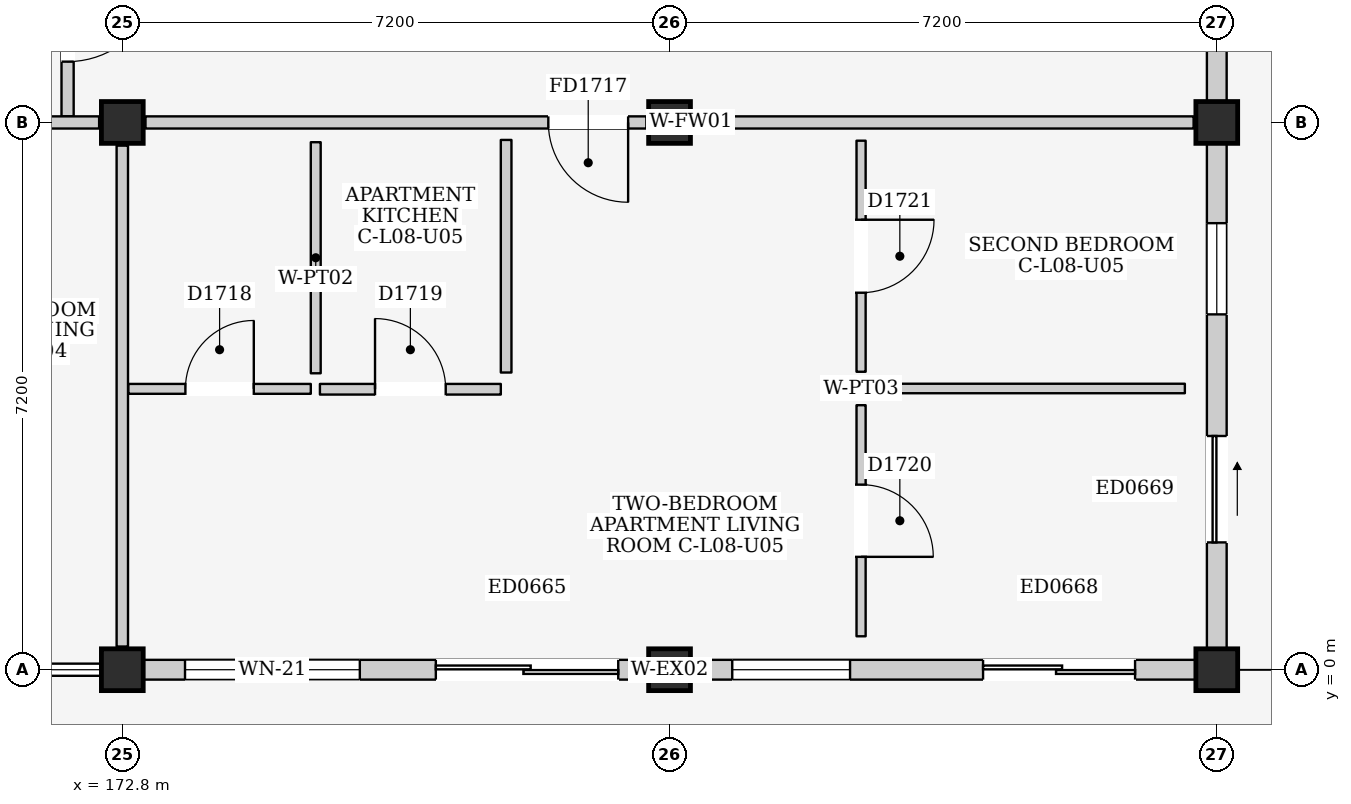
"""IFC4 building model, lengths in metres.
Left out: names, types, materials, properties, quantities, classifications, styles, units other than length and angle.
Written with IfcOpenShell. Run it as: python <this file> out.ifc"""

import sys

from ifc_helpers import new_model, si_unit, direction, frame, frame_2d, origin, origin_2d, place, context, subcontext, project, spatial, rectangle, extrude, element, fill, save


model = new_model("IFC4")
c1 = context("Model", 3, precision=1e-05, world=origin(), true_north=direction((0.0, 1.0)))
c2 = subcontext(c1, "Body", "Model", "MODEL_VIEW")
j1 = project(units=[si_unit("LENGTHUNIT", "METRE"), si_unit("PLANEANGLEUNIT", "RADIAN")], contexts=[c1])
p1 = place(None, origin())
s1 = spatial("IfcSite", under=j1, at=p1, CompositionType="ELEMENT")
p2 = place(p1, origin())
s2 = spatial("IfcBuilding", under=s1, at=p2, CompositionType="ELEMENT")
p3 = place(p2, frame((0.0, 0.0, 28.3)))
s3 = spatial("IfcBuildingStorey", under=s2, at=p3, CompositionType="ELEMENT", Elevation=28.3)
for number, where, z_axis, x_axis in (
    (1, (172.8, 0.0, 0.0), (0.0, 0.0, 1.0), (1.0, 0.0, 0.0)),
    (2, (172.8, 7.2, 0.0), (0.0, 0.0, 1.0), (1.0, 0.0, 0.0)),
    (3, (180.0, 0.0, 0.0), (0.0, 0.0, 1.0), (1.0, 0.0, 0.0)),
    (4, (180.0, 7.2, 0.0), (0.0, 0.0, 1.0), (1.0, 0.0, 0.0)),
    (5, (187.2, 0.0, 0.0), (0.0, 0.0, 1.0), (1.0, 0.0, 0.0)),
    (6, (187.2, 7.2, 0.0), (0.0, 0.0, 1.0), (1.0, 0.0, 0.0)),
):
    element("IfcColumn", number, at=place(p3, frame(where, z_axis=z_axis, x_axis=x_axis)), inside=s3, PredefinedType="COLUMN", context=c2, shape_type="SweptSolid", body=[
        extrude(rectangle(XDim=0.55, YDim=0.55, at=origin_2d()), origin(), (0.0, 0.0, 1.0), 3.2),
    ])
p4 = place(p3, frame((173.075, 0.0, 0.0), z_axis=(0.0, 0.0, 1.0), x_axis=(1.0, 0.0, 0.0)))
e7 = element("IfcWall", 7, at=p4, inside=s3, PredefinedType="ELEMENTEDWALL", context=c2, shape_type="SweptSolid", body=[
    extrude(rectangle(XDim=6.65, YDim=0.26, at=frame_2d((3.325, 0.0))), origin(), (0.0, 0.0, 1.0), 2.485),
])
p5 = place(p4, frame((3.85, 0.0, 0.0)))
e8 = element("IfcOpeningElement", 8, at=p5, cuts=e7, PredefinedType="OPENING", context=c2, shape_type="SweptSolid", body=[
    extrude(rectangle(XDim=2.4, YDim=2.12, at=frame_2d((1.2, 1.06))), frame((0.0, 0.145, 0.0), z_axis=(0.0, -1.0, 0.0), x_axis=(1.0, 0.0, 0.0)), (0.0, 0.0, 1.0), 0.29),
])
p6 = place(p4, frame((0.55, 0.0, 0.775)))
e9 = element("IfcOpeningElement", 9, at=p6, cuts=e7, PredefinedType="OPENING", context=c2, shape_type="SweptSolid", body=[
    extrude(rectangle(XDim=2.3, YDim=1.6, at=frame_2d((1.15, 0.8))), frame((0.0, 0.145, 0.0), z_axis=(0.0, -1.0, 0.0), x_axis=(1.0, 0.0, 0.0)), (0.0, 0.0, 1.0), 0.29),
])
p7 = place(p3, frame((180.275, 0.0, 0.0), z_axis=(0.0, 0.0, 1.0), x_axis=(1.0, 0.0, 0.0)))
e10 = element("IfcWall", 10, at=p7, inside=s3, PredefinedType="ELEMENTEDWALL", context=c2, shape_type="SweptSolid", body=[
    extrude(rectangle(XDim=6.65, YDim=0.26, at=frame_2d((3.325, 0.0))), origin(), (0.0, 0.0, 1.0), 2.485),
])
p8 = place(p7, frame((3.85, 0.0, 0.0)))
e11 = element("IfcOpeningElement", 11, at=p8, cuts=e10, PredefinedType="OPENING", context=c2, shape_type="SweptSolid", body=[
    extrude(rectangle(XDim=2.0, YDim=2.12, at=frame_2d((1.0, 1.06))), frame((0.0, 0.145, 0.0), z_axis=(0.0, -1.0, 0.0), x_axis=(1.0, 0.0, 0.0)), (0.0, 0.0, 1.0), 0.29),
])
p9 = place(p7, frame((0.55, 0.0, 0.9)))
e12 = element("IfcOpeningElement", 12, at=p9, cuts=e10, PredefinedType="OPENING", context=c2, shape_type="SweptSolid", body=[
    extrude(rectangle(XDim=1.55, YDim=1.45, at=frame_2d((0.775, 0.725))), frame((0.0, 0.145, 0.0), z_axis=(0.0, -1.0, 0.0), x_axis=(1.0, 0.0, 0.0)), (0.0, 0.0, 1.0), 0.29),
])
p10 = place(p3, frame((187.2, 0.275, 0.0), z_axis=(0.0, 0.0, 1.0), x_axis=(0.0, 1.0, 0.0)))
e13 = element("IfcWall", 13, at=p10, inside=s3, PredefinedType="ELEMENTEDWALL", context=c2, shape_type="SweptSolid", body=[
    extrude(rectangle(XDim=6.65, YDim=0.26, at=frame_2d((3.325, 0.0))), origin(), (0.0, 0.0, 1.0), 2.485),
])
p11 = place(p10, frame((1.4, 0.0, 0.0)))
e14 = element("IfcOpeningElement", 14, at=p11, cuts=e13, PredefinedType="OPENING", context=c2, shape_type="SweptSolid", body=[
    extrude(rectangle(XDim=1.4, YDim=2.1, at=frame_2d((0.7, 1.05))), frame((0.0, 0.145, 0.0), z_axis=(0.0, -1.0, 0.0), x_axis=(1.0, 0.0, 0.0)), (0.0, 0.0, 1.0), 0.29),
])
p12 = place(p10, frame((4.4, 0.0, 0.95)))
e15 = element("IfcOpeningElement", 15, at=p12, cuts=e13, PredefinedType="OPENING", context=c2, shape_type="SweptSolid", body=[
    extrude(rectangle(XDim=1.2, YDim=1.35, at=frame_2d((0.6, 0.675))), frame((0.0, 0.145, 0.0), z_axis=(0.0, -1.0, 0.0), x_axis=(1.0, 0.0, 0.0)), (0.0, 0.0, 1.0), 0.29),
])
p13 = place(p3, frame((187.2, 7.475, 0.0), z_axis=(0.0, 0.0, 1.0), x_axis=(0.0, 1.0, 0.0)))
e16 = element("IfcWall", 16, at=p13, inside=s3, PredefinedType="ELEMENTEDWALL", context=c2, shape_type="SweptSolid", body=[
    extrude(rectangle(XDim=6.65, YDim=0.26, at=frame_2d((3.325, 0.0))), origin(), (0.0, 0.0, 1.0), 2.485),
])
p14 = place(p13, frame((3.65, 0.0, 0.0)))
e17 = element("IfcOpeningElement", 17, at=p14, cuts=e16, PredefinedType="OPENING", context=c2, shape_type="SweptSolid", body=[
    extrude(rectangle(XDim=1.4, YDim=2.1, at=frame_2d((0.7, 1.05))), frame((0.0, 0.145, 0.0), z_axis=(0.0, -1.0, 0.0), x_axis=(1.0, 0.0, 0.0)), (0.0, 0.0, 1.0), 0.29),
])
p15 = place(p3, frame((172.08, 7.28, 0.0), z_axis=(0.0, 0.0, 1.0), x_axis=(0.0, 1.0, 0.0)))
e18 = element("IfcWall", 18, at=p15, inside=s3, PredefinedType="PARTITIONING", context=c2, shape_type="SweptSolid", body=[
    extrude(rectangle(XDim=4.32, YDim=0.16, at=frame_2d((2.16, 0.0))), origin(), (0.0, 0.0, 1.0), 2.95),
])
p16 = place(p15, frame((0.72, 0.0, 0.0)))
e19 = element("IfcOpeningElement", 19, at=p16, cuts=e18, PredefinedType="OPENING", context=c2, shape_type="SweptSolid", body=[
    extrude(rectangle(XDim=1.2, YDim=2.2, at=frame_2d((0.6, 1.1))), frame((0.0, 0.095, 0.0), z_axis=(0.0, -1.0, 0.0), x_axis=(1.0, 0.0, 0.0)), (0.0, 0.0, 1.0), 0.19),
])
p17 = place(p3, frame((165.905, 7.2, 0.0), z_axis=(0.0, 0.0, 1.0), x_axis=(1.0, 0.0, 0.0)))
e20 = element("IfcWall", 20, at=p17, inside=s3, PredefinedType="PARTITIONING", context=c2, shape_type="SweptSolid", body=[
    extrude(rectangle(XDim=6.59, YDim=0.16, at=frame_2d((3.295, 0.0))), origin(), (0.0, 0.0, 1.0), 2.335),
])
p18 = place(p17, frame((4.32, 0.0, 0.0)))
e21 = element("IfcOpeningElement", 21, at=p18, cuts=e20, PredefinedType="OPENING", context=c2, shape_type="SweptSolid", body=[
    extrude(rectangle(XDim=1.05, YDim=2.15, at=frame_2d((0.525, 1.075))), frame((0.0, 0.095, 0.0), z_axis=(0.0, -1.0, 0.0), x_axis=(1.0, 0.0, 0.0)), (0.0, 0.0, 1.0), 0.19),
])
p19 = place(p3, frame((172.8, 0.305, 0.0), z_axis=(0.0, 0.0, 1.0), x_axis=(0.0, 1.0, 0.0)))
e22 = element("IfcWall", 22, at=p19, inside=s3, PredefinedType="PARTITIONING", context=c2, shape_type="SweptSolid", body=[
    extrude(rectangle(XDim=6.59, YDim=0.15, at=frame_2d((3.295, 0.0))), origin(), (0.0, 0.0, 1.0), 2.435),
])
p20 = place(p3, frame((173.105, 7.2, 0.0), z_axis=(0.0, 0.0, 1.0), x_axis=(1.0, 0.0, 0.0)))
e23 = element("IfcWall", 23, at=p20, inside=s3, PredefinedType="PARTITIONING", context=c2, shape_type="SweptSolid", body=[
    extrude(rectangle(XDim=6.59, YDim=0.16, at=frame_2d((3.295, 0.0))), origin(), (0.0, 0.0, 1.0), 2.335),
])
p21 = place(p20, frame((5.3, 0.0, 0.0)))
e24 = element("IfcOpeningElement", 24, at=p21, cuts=e23, PredefinedType="OPENING", context=c2, shape_type="SweptSolid", body=[
    extrude(rectangle(XDim=1.05, YDim=2.15, at=frame_2d((0.525, 1.075))), frame((0.0, 0.095, 0.0), z_axis=(0.0, -1.0, 0.0), x_axis=(1.0, 0.0, 0.0)), (0.0, 0.0, 1.0), 0.19),
])
p22 = place(p3, frame((180.305, 7.2, 0.0), z_axis=(0.0, 0.0, 1.0), x_axis=(1.0, 0.0, 0.0)))
e25 = element("IfcWall", 25, at=p22, inside=s3, PredefinedType="PARTITIONING", context=c2, shape_type="SweptSolid", body=[
    extrude(rectangle(XDim=6.59, YDim=0.16, at=frame_2d((3.295, 0.0))), origin(), (0.0, 0.0, 1.0), 2.335),
])
p23 = place(p3, frame((172.88, 3.695, 0.0), z_axis=(0.0, 0.0, 1.0), x_axis=(1.0, 0.0, 0.0)))
e26 = element("IfcWall", 26, at=p23, inside=s3, PredefinedType="PARTITIONING", context=c2, shape_type="SweptSolid", body=[
    extrude(rectangle(XDim=2.4, YDim=0.13, at=frame_2d((1.2, 0.0))), origin(), (0.0, 0.0, 1.0), 2.95),
])
p24 = place(p23, frame((0.75, 0.0, 0.0)))
e27 = element("IfcOpeningElement", 27, at=p24, cuts=e26, PredefinedType="OPENING", context=c2, shape_type="SweptSolid", body=[
    extrude(rectangle(XDim=0.9, YDim=2.1, at=frame_2d((0.45, 1.05))), frame((0.0, 0.08, 0.0), z_axis=(0.0, -1.0, 0.0), x_axis=(1.0, 0.0, 0.0)), (0.0, 0.0, 1.0), 0.16),
])
p25 = place(p3, frame((175.345, 3.9, 0.0), z_axis=(0.0, 0.0, 1.0), x_axis=(0.0, 1.0, 0.0)))
e28 = element("IfcWall", 28, at=p25, inside=s3, PredefinedType="PARTITIONING", context=c2, shape_type="SweptSolid", body=[
    extrude(rectangle(XDim=3.04, YDim=0.13, at=frame_2d((1.52, 0.0))), origin(), (0.0, 0.0, 1.0), 2.95),
])
p26 = place(p3, frame((175.4, 3.69, 0.0), z_axis=(0.0, 0.0, 1.0), x_axis=(1.0, 0.0, 0.0)))
e29 = element("IfcWall", 29, at=p26, inside=s3, PredefinedType="PARTITIONING", context=c2, shape_type="SweptSolid", body=[
    extrude(rectangle(XDim=2.38, YDim=0.14, at=frame_2d((1.19, 0.0))), origin(), (0.0, 0.0, 1.0), 2.95),
])
p27 = place(p26, frame((0.725, 0.0, 0.0)))
e30 = element("IfcOpeningElement", 30, at=p27, cuts=e29, PredefinedType="OPENING", context=c2, shape_type="SweptSolid", body=[
    extrude(rectangle(XDim=0.93, YDim=2.14, at=frame_2d((0.465, 1.07))), frame((0.0, 0.085, 0.0), z_axis=(0.0, -1.0, 0.0), x_axis=(1.0, 0.0, 0.0)), (0.0, 0.0, 1.0), 0.17),
])
p28 = place(p3, frame((177.85, 3.91, 0.0), z_axis=(0.0, 0.0, 1.0), x_axis=(0.0, 1.0, 0.0)))
e31 = element("IfcWall", 31, at=p28, inside=s3, PredefinedType="PARTITIONING", context=c2, shape_type="SweptSolid", body=[
    extrude(rectangle(XDim=3.06, YDim=0.14, at=frame_2d((1.53, 0.0))), origin(), (0.0, 0.0, 1.0), 2.95),
])
p29 = place(p3, frame((182.52, 0.44, 0.0), z_axis=(0.0, 0.0, 1.0), x_axis=(0.0, 1.0, 0.0)))
e32 = element("IfcWall", 32, at=p29, inside=s3, PredefinedType="PARTITIONING", context=c2, shape_type="SweptSolid", body=[
    extrude(rectangle(XDim=3.04, YDim=0.12, at=frame_2d((1.52, 0.0))), origin(), (0.0, 0.0, 1.0), 2.95),
])
p30 = place(p29, frame((1.045, 0.0, 0.0)))
e33 = element("IfcOpeningElement", 33, at=p30, cuts=e32, PredefinedType="OPENING", context=c2, shape_type="SweptSolid", body=[
    extrude(rectangle(XDim=0.95, YDim=2.15, at=frame_2d((0.475, 1.075))), frame((0.0, 0.075, 0.0), z_axis=(0.0, -1.0, 0.0), x_axis=(1.0, 0.0, 0.0)), (0.0, 0.0, 1.0), 0.15),
])
p31 = place(p3, frame((182.72, 3.7, 0.0), z_axis=(0.0, 0.0, 1.0), x_axis=(1.0, 0.0, 0.0)))
e34 = element("IfcWall", 34, at=p31, inside=s3, PredefinedType="PARTITIONING", context=c2, shape_type="SweptSolid", body=[
    extrude(rectangle(XDim=4.06, YDim=0.125, at=frame_2d((2.03, 0.0))), origin(), (0.0, 0.0, 1.0), 2.95),
])
p32 = place(p3, frame((182.52, 3.92, 0.0), z_axis=(0.0, 0.0, 1.0), x_axis=(0.0, 1.0, 0.0)))
e35 = element("IfcWall", 35, at=p32, inside=s3, PredefinedType="PARTITIONING", context=c2, shape_type="SweptSolid", body=[
    extrude(rectangle(XDim=3.04, YDim=0.12, at=frame_2d((1.52, 0.0))), origin(), (0.0, 0.0, 1.0), 2.95),
])
p33 = place(p32, frame((1.04, 0.0, 0.0)))
e36 = element("IfcOpeningElement", 36, at=p33, cuts=e35, PredefinedType="OPENING", context=c2, shape_type="SweptSolid", body=[
    extrude(rectangle(XDim=0.96, YDim=2.15, at=frame_2d((0.48, 1.075))), frame((0.0, 0.075, 0.0), z_axis=(0.0, -1.0, 0.0), x_axis=(1.0, 0.0, 0.0)), (0.0, 0.0, 1.0), 0.15),
])
p34 = place(p5, frame((2.4, 0.0, 0.0), z_axis=(0.0, 0.0, 1.0), x_axis=(-1.0, 0.0, 0.0)))
e37 = element("IfcDoor", 37, at=p34, inside=s3, OperationType="DOUBLE_DOOR_SLIDING", PredefinedType="DOOR", context=c2, shape_type="SweptSolid", body=[
    extrude(rectangle(XDim=2.4, YDim=2.12, at=frame_2d((1.2, 1.06))), frame((0.0, 0.025, 0.0), z_axis=(0.0, -1.0, 0.0), x_axis=(1.0, 0.0, 0.0)), (0.0, 0.0, 1.0), 0.05),
])
fill(e8, e37)
p35 = place(p6, origin())
e38 = element("IfcWindow", 38, at=p35, inside=s3, PartitioningType="TRIPLE_PANEL_VERTICAL", PredefinedType="WINDOW", context=c2, shape_type="SweptSolid", body=[
    extrude(rectangle(XDim=2.3, YDim=1.6, at=frame_2d((1.15, 0.8))), frame((0.0, 0.03, 0.0), z_axis=(0.0, -1.0, 0.0), x_axis=(1.0, 0.0, 0.0)), (0.0, 0.0, 1.0), 0.06),
])
fill(e9, e38)
p36 = place(p8, frame((2.0, 0.0, 0.0), z_axis=(0.0, 0.0, 1.0), x_axis=(-1.0, 0.0, 0.0)))
e39 = element("IfcDoor", 39, at=p36, inside=s3, OperationType="DOUBLE_DOOR_SLIDING", PredefinedType="DOOR", context=c2, shape_type="SweptSolid", body=[
    extrude(rectangle(XDim=2.0, YDim=2.12, at=frame_2d((1.0, 1.06))), frame((0.0, 0.025, 0.0), z_axis=(0.0, -1.0, 0.0), x_axis=(1.0, 0.0, 0.0)), (0.0, 0.0, 1.0), 0.05),
])
fill(e11, e39)
p37 = place(p9, origin())
e40 = element("IfcWindow", 40, at=p37, inside=s3, PartitioningType="DOUBLE_PANEL_VERTICAL", PredefinedType="WINDOW", context=c2, shape_type="SweptSolid", body=[
    extrude(rectangle(XDim=1.55, YDim=1.45, at=frame_2d((0.775, 0.725))), frame((0.0, 0.03, 0.0), z_axis=(0.0, -1.0, 0.0), x_axis=(1.0, 0.0, 0.0)), (0.0, 0.0, 1.0), 0.06),
])
fill(e12, e40)
p38 = place(p11, frame((1.4, 0.0, 0.0), z_axis=(0.0, 0.0, 1.0), x_axis=(-1.0, 0.0, 0.0)))
e41 = element("IfcDoor", 41, at=p38, inside=s3, OperationType="SLIDING_TO_RIGHT", PredefinedType="DOOR", context=c2, shape_type="SweptSolid", body=[
    extrude(rectangle(XDim=1.4, YDim=2.1, at=frame_2d((0.7, 1.05))), frame((0.0, 0.025, 0.0), z_axis=(0.0, -1.0, 0.0), x_axis=(1.0, 0.0, 0.0)), (0.0, 0.0, 1.0), 0.05),
])
fill(e14, e41)
p39 = place(p12, origin())
e42 = element("IfcWindow", 42, at=p39, inside=s3, PartitioningType="SINGLE_PANEL", PredefinedType="WINDOW", context=c2, shape_type="SweptSolid", body=[
    extrude(rectangle(XDim=1.2, YDim=1.35, at=frame_2d((0.6, 0.675))), frame((0.0, 0.03, 0.0), z_axis=(0.0, -1.0, 0.0), x_axis=(1.0, 0.0, 0.0)), (0.0, 0.0, 1.0), 0.06),
])
fill(e15, e42)
p40 = place(p16, frame((1.2, 0.0, 0.0), z_axis=(0.0, 0.0, 1.0), x_axis=(-1.0, 0.0, 0.0)))
e43 = element("IfcDoor", 43, at=p40, inside=s3, OperationType="SINGLE_SWING_LEFT", PredefinedType="DOOR", context=c2, shape_type="SweptSolid", body=[
    extrude(rectangle(XDim=1.2, YDim=2.2, at=frame_2d((0.6, 1.1))), frame((0.0, 0.025, 0.0), z_axis=(0.0, -1.0, 0.0), x_axis=(1.0, 0.0, 0.0)), (0.0, 0.0, 1.0), 0.05),
])
fill(e19, e43)
p41 = place(p21, frame((1.05, 0.0, 0.0), z_axis=(0.0, 0.0, 1.0), x_axis=(-1.0, 0.0, 0.0)))
e44 = element("IfcDoor", 44, at=p41, inside=s3, OperationType="SINGLE_SWING_LEFT", PredefinedType="DOOR", context=c2, shape_type="SweptSolid", body=[
    extrude(rectangle(XDim=1.05, YDim=2.15, at=frame_2d((0.525, 1.075))), frame((0.0, 0.025, 0.0), z_axis=(0.0, -1.0, 0.0), x_axis=(1.0, 0.0, 0.0)), (0.0, 0.0, 1.0), 0.05),
])
fill(e24, e44)
p42 = place(p24, origin())
e45 = element("IfcDoor", 45, at=p42, inside=s3, OperationType="SINGLE_SWING_RIGHT", PredefinedType="DOOR", context=c2, shape_type="SweptSolid", body=[
    extrude(rectangle(XDim=0.9, YDim=2.1, at=frame_2d((0.45, 1.05))), frame((0.0, 0.025, 0.0), z_axis=(0.0, -1.0, 0.0), x_axis=(1.0, 0.0, 0.0)), (0.0, 0.0, 1.0), 0.05),
])
fill(e27, e45)
p43 = place(p27, origin())
e46 = element("IfcDoor", 46, at=p43, inside=s3, OperationType="SINGLE_SWING_LEFT", PredefinedType="DOOR", context=c2, shape_type="SweptSolid", body=[
    extrude(rectangle(XDim=0.93, YDim=2.14, at=frame_2d((0.465, 1.07))), frame((0.0, 0.025, 0.0), z_axis=(0.0, -1.0, 0.0), x_axis=(1.0, 0.0, 0.0)), (0.0, 0.0, 1.0), 0.05),
])
fill(e30, e46)
p44 = place(p30, frame((0.95, 0.0, 0.0), z_axis=(0.0, 0.0, 1.0), x_axis=(-1.0, 0.0, 0.0)))
e47 = element("IfcDoor", 47, at=p44, inside=s3, OperationType="SINGLE_SWING_RIGHT", PredefinedType="DOOR", context=c2, shape_type="SweptSolid", body=[
    extrude(rectangle(XDim=0.95, YDim=2.15, at=frame_2d((0.475, 1.075))), frame((0.0, 0.025, 0.0), z_axis=(0.0, -1.0, 0.0), x_axis=(1.0, 0.0, 0.0)), (0.0, 0.0, 1.0), 0.05),
])
fill(e33, e47)
p45 = place(p33, frame((0.96, 0.0, 0.0), z_axis=(0.0, 0.0, 1.0), x_axis=(-1.0, 0.0, 0.0)))
e48 = element("IfcDoor", 48, at=p45, inside=s3, OperationType="SINGLE_SWING_LEFT", PredefinedType="DOOR", context=c2, shape_type="SweptSolid", body=[
    extrude(rectangle(XDim=0.96, YDim=2.15, at=frame_2d((0.48, 1.075))), frame((0.0, 0.025, 0.0), z_axis=(0.0, -1.0, 0.0), x_axis=(1.0, 0.0, 0.0)), (0.0, 0.0, 1.0), 0.05),
])
fill(e36, e48)
save(model, sys.argv[1])
